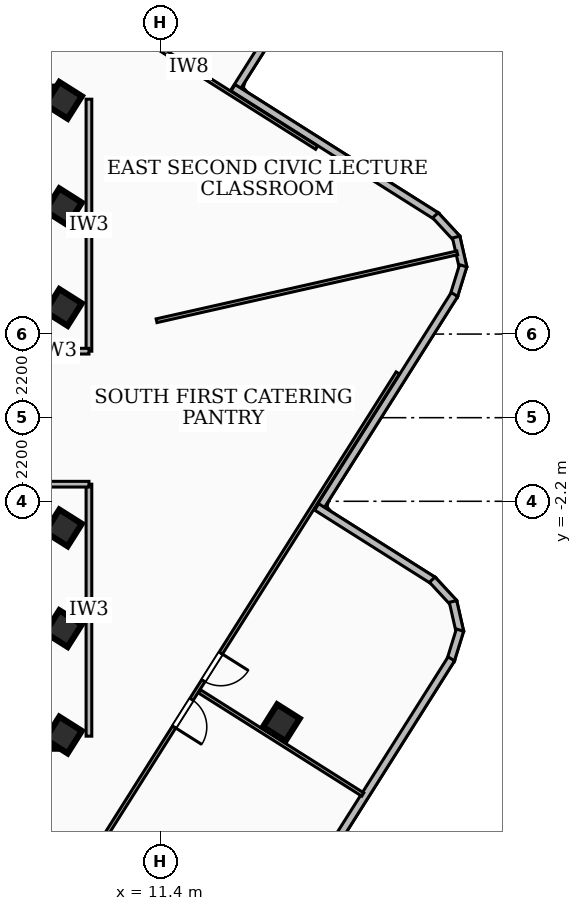
"""IFC4 building model, lengths in metres.
Left out: names, types, materials, properties, quantities, classifications, styles, units other than length and angle.
Written with IfcOpenShell. Run it as: python <this file> out.ifc"""

import sys

from ifc_helpers import new_model, si_unit, direction, frame, frame_2d, origin, origin_2d, place, context, subcontext, project, spatial, rectangle, extrude, element, fill, save


model = new_model("IFC4")
c1 = context("Model", 3, precision=1e-05, world=origin(), true_north=direction((0.0, 1.0)))
c2 = subcontext(c1, "Body", "Model", "MODEL_VIEW")
j1 = project(units=[si_unit("LENGTHUNIT", "METRE"), si_unit("PLANEANGLEUNIT", "RADIAN")], contexts=[c1])
p1 = place(None, origin())
s1 = spatial("IfcSite", under=j1, at=p1, CompositionType="ELEMENT")
p2 = place(p1, origin())
s2 = spatial("IfcBuilding", under=s1, at=p2, CompositionType="ELEMENT")
p3 = place(p2, frame((0.0, 0.0, 271.44)))
s3 = spatial("IfcBuildingStorey", under=s2, at=p3, CompositionType="ELEMENT", Elevation=271.44)
for number, where, z_axis, x_axis in (
    (1, (-8.78, 8.51, 0.0), (0.0, 0.0, 1.0), (1.0, 0.0, 0.0)),
    (2, (8.78, -8.51, 0.0), (0.0, 0.0, 1.0), (-1.0, 0.0, 0.0)),
):
    element("IfcWall", number, at=place(p3, frame(where, z_axis=z_axis, x_axis=x_axis)), inside=s3, PredefinedType="SHEAR", context=c2, shape_type="SweptSolid", body=[
        extrude(rectangle(XDim=17.56, YDim=0.4, at=frame_2d((8.78, 0.0))), origin(), (0.0, 0.0, 1.0), 3.16),
    ])
for number, where, z_axis, x_axis in (
    (3, (8.85, -5.55, 0.0), (0.0, 0.0, 1.0), (0.534, 0.845, 0.0)),
    (4, (8.85, -2.9, 0.0), (0.0, 0.0, 1.0), (0.534, 0.845, 0.0)),
    (5, (8.85, 2.9, 0.0), (0.0, 0.0, 1.0), (0.534, 0.845, 0.0)),
    (6, (8.85, 5.55, 0.0), (0.0, 0.0, 1.0), (0.534, 0.845, 0.0)),
    (7, (8.85, -8.35, 0.0), (0.0, 0.0, 1.0), (0.534, 0.845, 0.0)),
    (8, (8.85, 8.35, 0.0), (0.0, 0.0, 1.0), (0.534, 0.845, 0.0)),
    (9, (14.583, -8.026, 0.0), (0.0, 0.0, 1.0), (0.534, 0.845, 0.0)),
):
    element("IfcColumn", number, at=place(p3, frame(where, z_axis=z_axis, x_axis=x_axis)), inside=s3, PredefinedType="COLUMN", context=c2, shape_type="SweptSolid", body=[
        extrude(rectangle(XDim=0.7, YDim=0.7, at=origin_2d()), origin(), (0.0, 0.0, 1.0), 3.42),
    ])
p4 = place(p3, frame((17.74, 15.539, 0.0), z_axis=(0.0, 0.0, 1.0), x_axis=(-0.533941726163, -0.845521278893, 0.0)))
e10 = element("IfcWall", 10, at=p4, inside=s3, PredefinedType="SOLIDWALL", context=c2, shape_type="SweptSolid", body=[
    extrude(rectangle(XDim=8.242, YDim=0.2, at=frame_2d((4.121, 0.0))), origin(), (0.0, 0.0, 1.0), 3.16),
])
p5 = place(p4, frame((0.85, 0.0, 0.85)))
e11 = element("IfcOpeningElement", 11, at=p5, cuts=e10, PredefinedType="OPENING", context=c2, shape_type="SweptSolid", body=[
    extrude(rectangle(XDim=1.5, YDim=1.5, at=frame_2d((0.75, 0.75))), frame((0.0, 0.11, 0.0), z_axis=(0.0, -1.0, 0.0), x_axis=(1.0, 0.0, 0.0)), (0.0, 0.0, 1.0), 0.22),
])
p6 = place(p3, frame((13.314, 8.681, 0.0), z_axis=(0.0, 0.0, 1.0), x_axis=(0.845530066623, -0.533927810135, 0.0)))
e12 = element("IfcWall", 12, at=p6, inside=s3, PredefinedType="SOLIDWALL", context=c2, shape_type="SweptSolid", body=[
    extrude(rectangle(XDim=6.342, YDim=0.2, at=frame_2d((3.171, 0.0))), origin(), (0.0, 0.0, 1.0), 3.16),
])
p7 = place(p3, frame((18.638, 5.326, 0.0), z_axis=(0.0, 0.0, 1.0), x_axis=(0.678558613405, -0.734546260064, 0.0)))
e13 = element("IfcWall", 13, at=p7, inside=s3, PredefinedType="SOLIDWALL", context=c2, shape_type="SweptSolid", body=[
    extrude(rectangle(XDim=0.837, YDim=0.2, at=frame_2d((0.418, 0.0))), origin(), (0.0, 0.0, 1.0), 3.16),
])
p8 = place(p3, frame((19.183, 4.753, 0.0), z_axis=(0.0, 0.0, 1.0), x_axis=(0.22178748126, -0.975095027757, 0.0)))
e14 = element("IfcWall", 14, at=p8, inside=s3, PredefinedType="SOLIDWALL", context=c2, shape_type="SweptSolid", body=[
    extrude(rectangle(XDim=0.824, YDim=0.2, at=frame_2d((0.412, 0.0))), origin(), (0.0, 0.0, 1.0), 3.16),
])
p9 = place(p3, frame((19.367, 3.997, 0.0), z_axis=(0.0, 0.0, 1.0), x_axis=(-0.295803919306, -0.955248680357, 0.0)))
e15 = element("IfcWall", 15, at=p9, inside=s3, PredefinedType="SOLIDWALL", context=c2, shape_type="SweptSolid", body=[
    extrude(rectangle(XDim=0.839, YDim=0.2, at=frame_2d((0.419, 0.0))), origin(), (0.0, 0.0, 1.0), 3.16),
])
p10 = place(p3, frame((19.139, 3.241, 0.0), z_axis=(0.0, 0.0, 1.0), x_axis=(-0.534084270085, -0.845431246435, 0.0)))
e16 = element("IfcWall", 16, at=p10, inside=s3, PredefinedType="SOLIDWALL", context=c2, shape_type="SweptSolid", body=[
    extrude(rectangle(XDim=6.742, YDim=0.2, at=frame_2d((3.371, 0.0))), origin(), (0.0, 0.0, 1.0), 3.16),
])
p11 = place(p3, frame((15.513, -2.348, 0.0), z_axis=(0.0, 0.0, 1.0), x_axis=(0.8454427056, -0.534066130313, 0.0)))
e17 = element("IfcWall", 17, at=p11, inside=s3, PredefinedType="SOLIDWALL", context=c2, shape_type="SweptSolid", body=[
    extrude(rectangle(XDim=3.642, YDim=0.2, at=frame_2d((1.821, 0.0))), origin(), (0.0, 0.0, 1.0), 3.16),
])
p12 = place(p3, frame((18.554, -4.262, 0.0), z_axis=(0.0, 0.0, 1.0), x_axis=(0.679187212508, -0.73396507435, 0.0)))
e18 = element("IfcWall", 18, at=p12, inside=s3, PredefinedType="SOLIDWALL", context=c2, shape_type="SweptSolid", body=[
    extrude(rectangle(XDim=0.838, YDim=0.2, at=frame_2d((0.419, 0.0))), origin(), (0.0, 0.0, 1.0), 3.16),
])
p13 = place(p3, frame((19.1, -4.835, 0.0), z_axis=(0.0, 0.0, 1.0), x_axis=(0.222043922605, -0.975036664149, 0.0)))
e19 = element("IfcWall", 19, at=p13, inside=s3, PredefinedType="SOLIDWALL", context=c2, shape_type="SweptSolid", body=[
    extrude(rectangle(XDim=0.823, YDim=0.2, at=frame_2d((0.412, 0.0))), origin(), (0.0, 0.0, 1.0), 3.16),
])
p14 = place(p3, frame((19.284, -5.59, 0.0), z_axis=(0.0, 0.0, 1.0), x_axis=(-0.295803919306, -0.955248680357, 0.0)))
e20 = element("IfcWall", 20, at=p14, inside=s3, PredefinedType="SOLIDWALL", context=c2, shape_type="SweptSolid", body=[
    extrude(rectangle(XDim=0.839, YDim=0.2, at=frame_2d((0.419, 0.0))), origin(), (0.0, 0.0, 1.0), 3.16),
])
p15 = place(p3, frame((19.056, -6.346, 0.0), z_axis=(0.0, 0.0, 1.0), x_axis=(-0.534060804588, -0.845446069837, 0.0)))
e21 = element("IfcWall", 21, at=p15, inside=s3, PredefinedType="SOLIDWALL", context=c2, shape_type="SweptSolid", body=[
    extrude(rectangle(XDim=10.023, YDim=0.2, at=frame_2d((5.012, 0.0))), origin(), (0.0, 0.0, 1.0), 3.16),
])
p16 = place(p15, frame((7.068, 0.0, 0.85)))
e22 = element("IfcOpeningElement", 22, at=p16, cuts=e21, PredefinedType="OPENING", context=c2, shape_type="SweptSolid", body=[
    extrude(rectangle(XDim=1.5, YDim=1.5, at=frame_2d((0.75, 0.75))), frame((0.0, 0.11, 0.0), z_axis=(0.0, -1.0, 0.0), x_axis=(1.0, 0.0, 0.0)), (0.0, 0.0, 1.0), 0.22),
])
p17 = place(p3, frame((9.52, 1.75, 0.0), z_axis=(0.0, 0.0, 1.0), x_axis=(0.0, 1.0, 0.0)))
e23 = element("IfcWall", 23, at=p17, inside=s3, PredefinedType="PARTITIONING", context=c2, shape_type="SweptSolid", body=[
    extrude(rectangle(XDim=6.63, YDim=0.15, at=frame_2d((3.315, 0.0))), origin(), (0.0, 0.0, 1.0), 3.16),
])
p18 = place(p3, frame((7.85, 1.75, 0.0), z_axis=(0.0, 0.0, 1.0), x_axis=(1.0, 0.0, 0.0)))
e24 = element("IfcWall", 24, at=p18, inside=s3, PredefinedType="PARTITIONING", context=c2, shape_type="SweptSolid", body=[
    extrude(rectangle(XDim=1.67, YDim=0.15, at=frame_2d((0.835, 0.0))), origin(), (0.0, 0.0, 1.0), 2.39),
])
p19 = place(p3, frame((9.52, -8.38, 0.0), z_axis=(0.0, 0.0, 1.0), x_axis=(0.0, 1.0, 0.0)))
e25 = element("IfcWall", 25, at=p19, inside=s3, PredefinedType="PARTITIONING", context=c2, shape_type="SweptSolid", body=[
    extrude(rectangle(XDim=6.63, YDim=0.15, at=frame_2d((3.315, 0.0))), origin(), (0.0, 0.0, 1.0), 2.53),
])
p20 = place(p3, frame((7.85, -1.75, 0.0), z_axis=(0.0, 0.0, 1.0), x_axis=(1.0, 0.0, 0.0)))
e26 = element("IfcWall", 26, at=p20, inside=s3, PredefinedType="PARTITIONING", context=c2, shape_type="SweptSolid", body=[
    extrude(rectangle(XDim=1.67, YDim=0.15, at=frame_2d((0.835, 0.0))), origin(), (0.0, 0.0, 1.0), 2.39),
])
p21 = place(p3, frame((11.3, 2.551, 0.0), z_axis=(0.0, 0.0, 1.0), x_axis=(0.975452684537, 0.220209128395, 0.0)))
e27 = element("IfcWall", 27, at=p21, inside=s3, PredefinedType="PARTITIONING", context=c2, shape_type="SweptSolid", body=[
    extrude(rectangle(XDim=8.11, YDim=0.1, at=frame_2d((4.055, 0.0))), origin(), (0.0, 0.0, 1.0), 3.16),
])
p22 = place(p3, frame((15.512, 7.104, 0.0), z_axis=(0.0, 0.0, 1.0), x_axis=(-0.845450958208, 0.534053065963, 0.0)))
e28 = element("IfcWall", 28, at=p22, inside=s3, PredefinedType="PARTITIONING", context=c2, shape_type="SweptSolid", body=[
    extrude(rectangle(XDim=7.951, YDim=0.1, at=frame_2d((3.975, 0.0))), origin(), (0.0, 0.0, 1.0), 2.53),
])
p23 = place(p3, frame((12.426, -7.199, 0.0), z_axis=(0.0, 0.0, 1.0), x_axis=(0.845412458252, -0.53411400977, 0.0)))
e29 = element("IfcWall", 29, at=p23, inside=s3, PredefinedType="PARTITIONING", context=c2, shape_type="SweptSolid", body=[
    extrude(rectangle(XDim=5.085, YDim=0.1, at=frame_2d((2.542, 0.0))), origin(), (0.0, 0.0, 1.0), 2.53),
])
p24 = place(p3, frame((17.646, 1.178, 0.0), z_axis=(0.0, 0.0, 1.0), x_axis=(-0.534052309352, -0.845451436143, 0.0)))
e30 = element("IfcWall", 30, at=p24, inside=s3, PredefinedType="PARTITIONING", context=c2, shape_type="SweptSolid", body=[
    extrude(rectangle(XDim=20.44, YDim=0.1, at=frame_2d((10.22, 0.0))), origin(), (0.0, 0.0, 1.0), 2.53),
])
p25 = place(p24, frame((10.159, 0.0, 0.0)))
e31 = element("IfcOpeningElement", 31, at=p25, cuts=e30, PredefinedType="OPENING", context=c2, shape_type="SweptSolid", body=[
    extrude(rectangle(XDim=0.86, YDim=2.04, at=frame_2d((0.43, 1.02))), frame((0.0, 0.06, 0.0), z_axis=(0.0, -1.0, 0.0), x_axis=(1.0, 0.0, 0.0)), (0.0, 0.0, 1.0), 0.12),
])
p26 = place(p24, frame((8.719, 0.0, 0.0)))
e32 = element("IfcOpeningElement", 32, at=p26, cuts=e30, PredefinedType="OPENING", context=c2, shape_type="SweptSolid", body=[
    extrude(rectangle(XDim=0.86, YDim=2.04, at=frame_2d((0.43, 1.02))), frame((0.0, 0.06, 0.0), z_axis=(0.0, -1.0, 0.0), x_axis=(1.0, 0.0, 0.0)), (0.0, 0.0, 1.0), 0.12),
])
p27 = place(p25, origin())
e33 = element("IfcDoor", 33, at=p27, inside=s3, OperationType="SINGLE_SWING_RIGHT", PredefinedType="DOOR", context=c2, shape_type="SweptSolid", body=[
    extrude(rectangle(XDim=0.86, YDim=2.04, at=frame_2d((0.43, 1.02))), frame((0.0, 0.025, 0.0), z_axis=(0.0, -1.0, 0.0), x_axis=(1.0, 0.0, 0.0)), (0.0, 0.0, 1.0), 0.05),
])
fill(e31, e33)
p28 = place(p26, origin())
e34 = element("IfcDoor", 34, at=p28, inside=s3, OperationType="SINGLE_SWING_LEFT", PredefinedType="DOOR", context=c2, shape_type="SweptSolid", body=[
    extrude(rectangle(XDim=0.86, YDim=2.04, at=frame_2d((0.43, 1.02))), frame((0.0, 0.025, 0.0), z_axis=(0.0, -1.0, 0.0), x_axis=(1.0, 0.0, 0.0)), (0.0, 0.0, 1.0), 0.05),
])
fill(e32, e34)
save(model, sys.argv[1])
